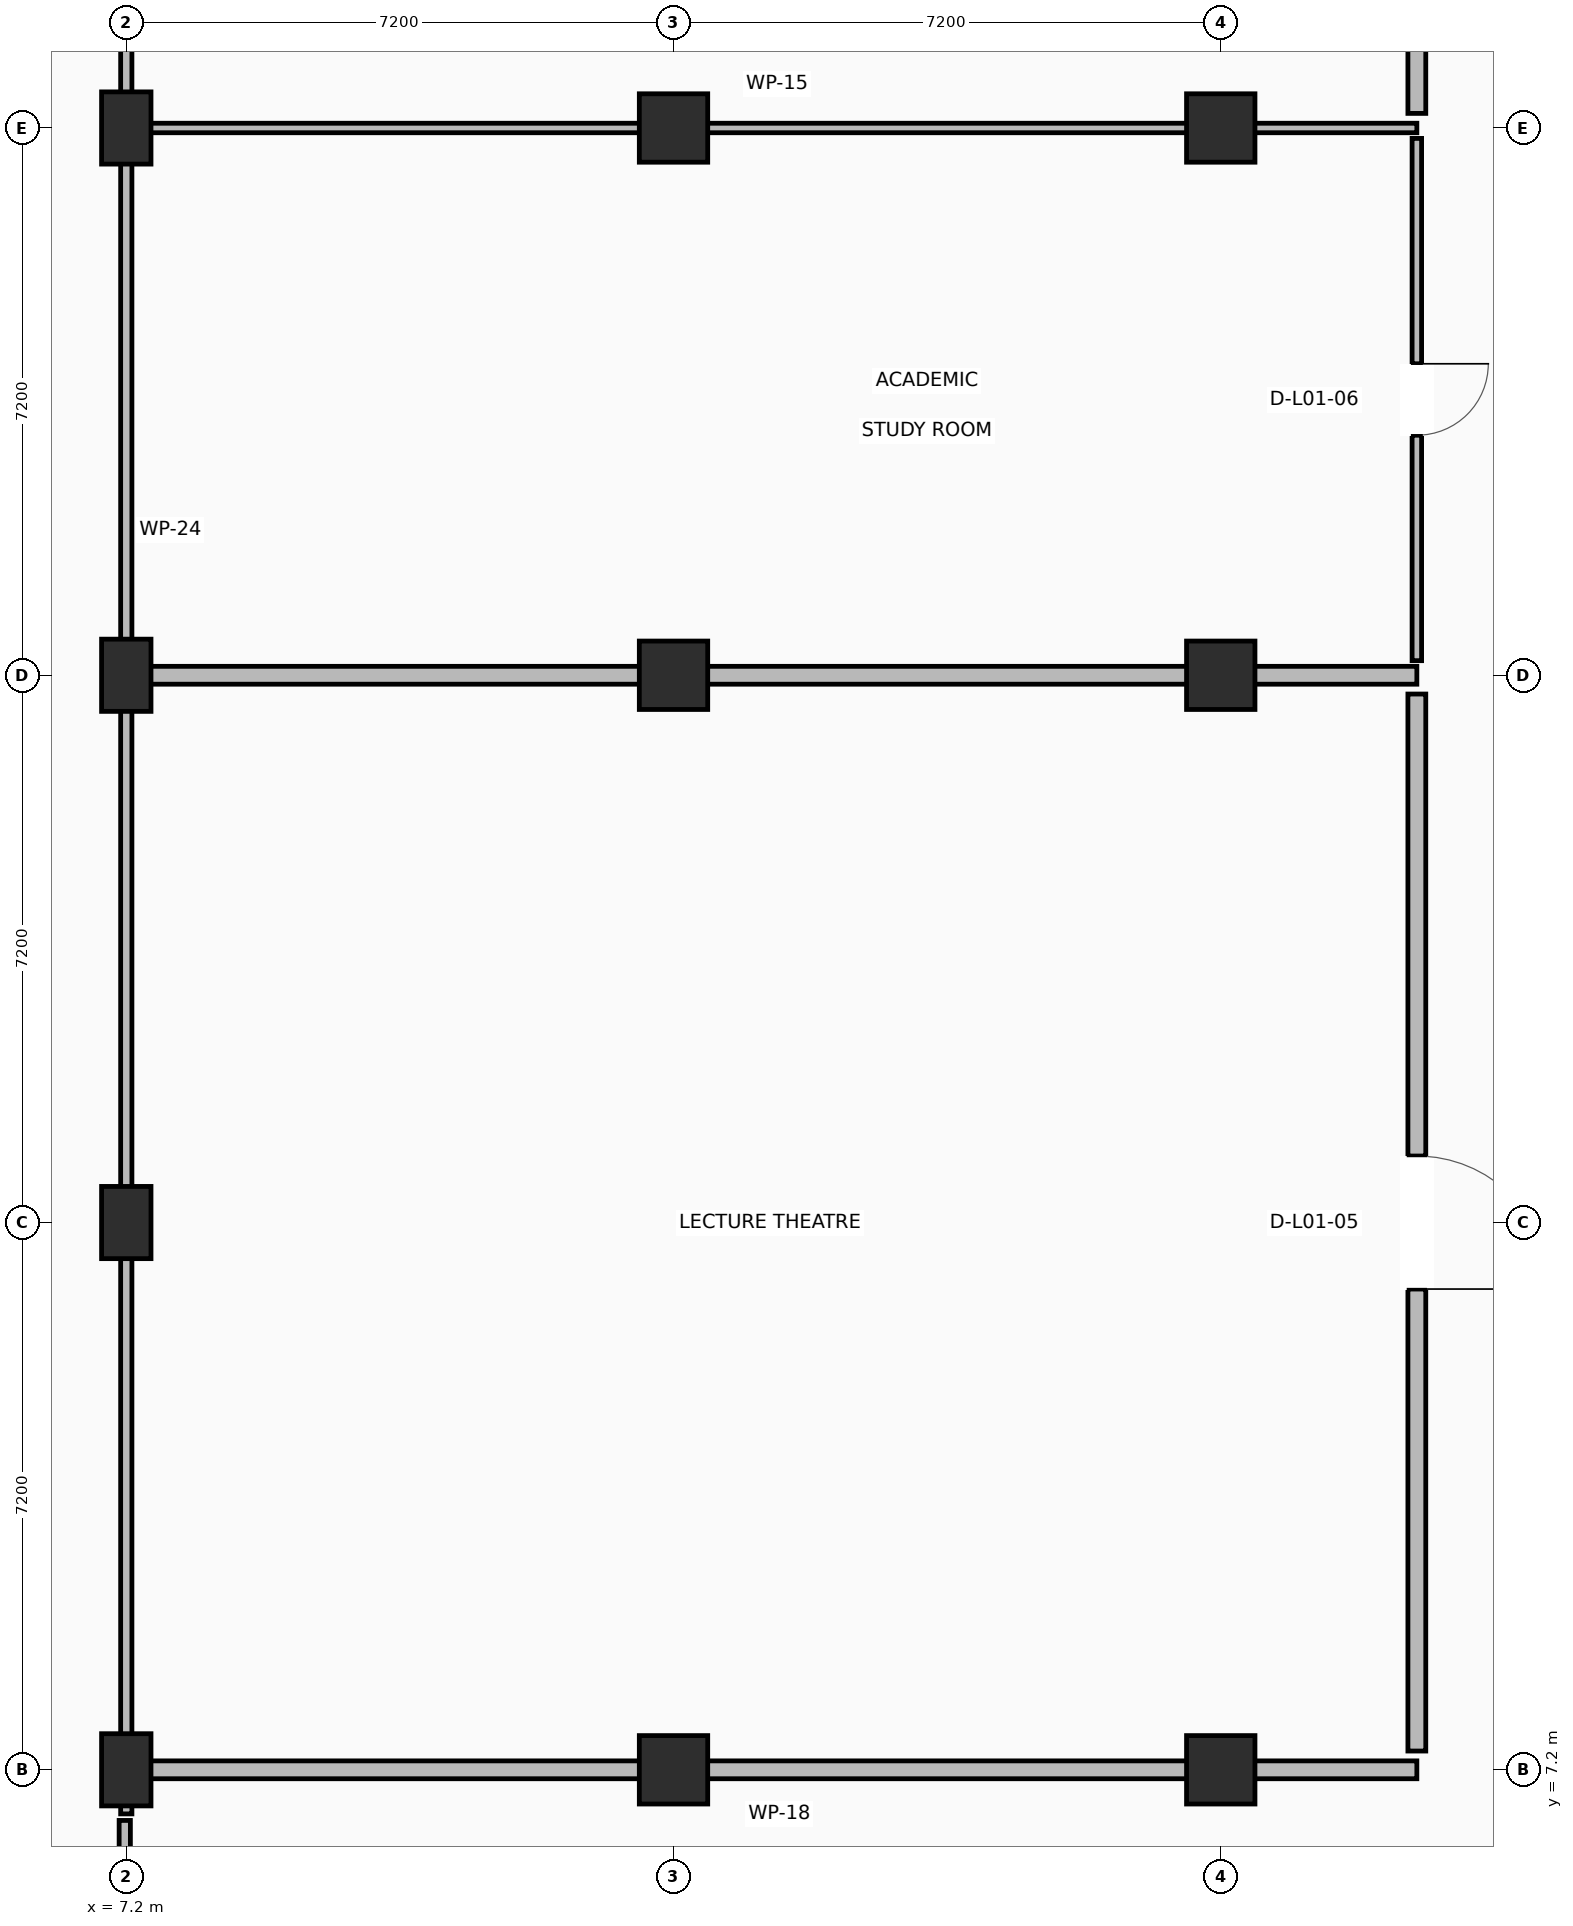
"""IFC4 building model, lengths in metres.
Left out: names, types, materials, properties, quantities, classifications, styles, units other than length and angle.
Written with IfcOpenShell. Run it as: python <this file> out.ifc"""

import sys

from ifc_helpers import new_model, si_unit, direction, frame, frame_2d, origin, origin_2d, place, context, subcontext, project, spatial, rectangle, extrude, element, fill, save


model = new_model("IFC4")
c1 = context("Model", 3, precision=1e-05, world=origin(), true_north=direction((0.0, 1.0)))
c2 = subcontext(c1, "Body", "Model", "MODEL_VIEW")
j1 = project(units=[si_unit("LENGTHUNIT", "METRE"), si_unit("PLANEANGLEUNIT", "RADIAN")], contexts=[c1])
p1 = place(None, origin())
s1 = spatial("IfcSite", under=j1, at=p1, CompositionType="ELEMENT")
p2 = place(p1, origin())
s2 = spatial("IfcBuilding", under=s1, at=p2, CompositionType="ELEMENT")
p3 = place(p2, frame((0.0, 0.0, 4.5)))
s3 = spatial("IfcBuildingStorey", under=s2, at=p3, CompositionType="ELEMENT", Elevation=4.5)
for number, where, z_axis, x_axis in (
    (1, (7.2, 7.2, 0.0), (0.0, 0.0, 1.0), (1.0, 0.0, 0.0)),
    (2, (7.2, 14.4, 0.0), (0.0, 0.0, 1.0), (1.0, 0.0, 0.0)),
    (3, (7.2, 21.6, 0.0), (0.0, 0.0, 1.0), (1.0, 0.0, 0.0)),
    (4, (7.2, 28.8, 0.0), (0.0, 0.0, 1.0), (1.0, 0.0, 0.0)),
):
    element("IfcColumn", number, at=place(p3, frame(where, z_axis=z_axis, x_axis=x_axis)), inside=s3, PredefinedType="COLUMN", context=c2, shape_type="SweptSolid", body=[
        extrude(rectangle(XDim=0.65, YDim=0.95, at=origin_2d()), origin(), (0.0, 0.0, 1.0), 4.5),
    ])
for number, where, z_axis, x_axis in (
    (5, (14.4, 7.2, 0.0), (0.0, 0.0, 1.0), (1.0, 0.0, 0.0)),
    (6, (14.4, 21.6, 0.0), (0.0, 0.0, 1.0), (1.0, 0.0, 0.0)),
    (7, (14.4, 28.8, 0.0), (0.0, 0.0, 1.0), (1.0, 0.0, 0.0)),
    (8, (21.6, 7.2, 0.0), (0.0, 0.0, 1.0), (1.0, 0.0, 0.0)),
    (9, (21.6, 21.6, 0.0), (0.0, 0.0, 1.0), (1.0, 0.0, 0.0)),
    (10, (21.6, 28.8, 0.0), (0.0, 0.0, 1.0), (1.0, 0.0, 0.0)),
):
    element("IfcColumn", number, at=place(p3, frame(where, z_axis=z_axis, x_axis=x_axis)), inside=s3, PredefinedType="COLUMN", context=c2, shape_type="SweptSolid", body=[
        extrude(rectangle(XDim=0.9, YDim=0.9, at=origin_2d()), origin(), (0.0, 0.0, 1.0), 4.5),
    ])
p4 = place(p3, frame((7.2, 42.774, 0.0), z_axis=(0.0, 0.0, 1.0), x_axis=(0.0, -1.0, 0.0)))
e11 = element("IfcWall", 11, at=p4, inside=s3, PredefinedType="PARTITIONING", context=c2, shape_type="SweptSolid", body=[
    extrude(rectangle(XDim=36.154, YDim=0.148, at=frame_2d((18.077, 0.0))), origin(), (0.0, 0.0, 1.0), 3.26),
])
p5 = place(p3, frame((7.18, 6.534, 0.0), z_axis=(0.0, 0.0, 1.0), x_axis=(0.0, -1.0, 0.0)))
e12 = element("IfcWall", 12, at=p5, inside=s3, PredefinedType="PARTITIONING", context=c2, shape_type="SweptSolid", body=[
    extrude(rectangle(XDim=2.934, YDim=0.148, at=frame_2d((1.467, 0.0))), origin(), (0.0, 0.0, 1.0), 3.26),
])
p6 = place(p5, frame((1.007, 0.0, 0.0)))
e13 = element("IfcOpeningElement", 13, at=p6, cuts=e12, PredefinedType="OPENING", context=c2, shape_type="SweptSolid", body=[
    extrude(rectangle(XDim=0.92, YDim=2.1, at=frame_2d((0.46, 1.05))), frame((0.0, 0.084, 0.0), z_axis=(0.0, -1.0, 0.0), x_axis=(1.0, 0.0, 0.0)), (0.0, 0.0, 1.0), 0.168),
])
for number, where, z_axis, x_axis in (
    (14, (24.18, 7.2, 0.0), (0.0, 0.0, 1.0), (-1.0, 0.0, 0.0)),
    (15, (7.404, 21.6, 0.0), (0.0, 0.0, 1.0), (1.0, 0.0, 0.0)),
):
    element("IfcWall", number, at=place(p3, frame(where, z_axis=z_axis, x_axis=x_axis)), inside=s3, PredefinedType="PARTITIONING", context=c2, shape_type="SweptSolid", body=[
        extrude(rectangle(XDim=16.776, YDim=0.235, at=frame_2d((8.388, 0.0))), origin(), (0.0, 0.0, 1.0), 3.26),
    ])
p7 = place(p3, frame((24.18, 21.353, 0.0), z_axis=(0.0, 0.0, 1.0), x_axis=(0.0, -1.0, 0.0)))
e16 = element("IfcWall", 16, at=p7, inside=s3, PredefinedType="PARTITIONING", context=c2, shape_type="SweptSolid", body=[
    extrude(rectangle(XDim=13.906, YDim=0.235, at=frame_2d((6.953, 0.0))), origin(), (0.0, 0.0, 1.0), 3.26),
])
p8 = place(p7, frame((6.078, 0.0, 0.0)))
e17 = element("IfcOpeningElement", 17, at=p8, cuts=e16, PredefinedType="OPENING", context=c2, shape_type="SweptSolid", body=[
    extrude(rectangle(XDim=1.75, YDim=2.25, at=frame_2d((0.875, 1.125))), frame((0.0, 0.127, 0.0), z_axis=(0.0, -1.0, 0.0), x_axis=(1.0, 0.0, 0.0)), (0.0, 0.0, 1.0), 0.255),
])
p9 = place(p3, frame((7.348, 28.8, 0.0), z_axis=(0.0, 0.0, 1.0), x_axis=(1.0, 0.0, 0.0)))
e18 = element("IfcWall", 18, at=p9, inside=s3, PredefinedType="PARTITIONING", context=c2, shape_type="SweptSolid", body=[
    extrude(rectangle(XDim=16.832, YDim=0.125, at=frame_2d((8.416, 0.0))), origin(), (0.0, 0.0, 1.0), 3.26),
])
p10 = place(p3, frame((24.18, 28.663, 0.0), z_axis=(0.0, 0.0, 1.0), x_axis=(0.0, -1.0, 0.0)))
e19 = element("IfcWall", 19, at=p10, inside=s3, PredefinedType="PARTITIONING", context=c2, shape_type="SweptSolid", body=[
    extrude(rectangle(XDim=6.871, YDim=0.125, at=frame_2d((3.436, 0.0))), origin(), (0.0, 0.0, 1.0), 3.26),
])
p11 = place(p10, frame((2.965, 0.0, 0.0)))
e20 = element("IfcOpeningElement", 20, at=p11, cuts=e19, PredefinedType="OPENING", context=c2, shape_type="SweptSolid", body=[
    extrude(rectangle(XDim=0.94, YDim=2.1, at=frame_2d((0.47, 1.05))), frame((0.0, 0.073, 0.0), z_axis=(0.0, -1.0, 0.0), x_axis=(1.0, 0.0, 0.0)), (0.0, 0.0, 1.0), 0.145),
])
p12 = place(p3, frame((24.18, 39.0, 0.0), z_axis=(0.0, 0.0, 1.0), x_axis=(0.0, -1.0, 0.0)))
e21 = element("IfcWall", 21, at=p12, inside=s3, PredefinedType="PARTITIONING", context=c2, shape_type="SweptSolid", body=[
    extrude(rectangle(XDim=10.008, YDim=0.235, at=frame_2d((5.004, 0.0))), origin(), (0.0, 0.0, 1.0), 3.26),
])
p13 = place(p12, frame((4.129, 0.0, 0.0)))
e22 = element("IfcOpeningElement", 22, at=p13, cuts=e21, PredefinedType="OPENING", context=c2, shape_type="SweptSolid", body=[
    extrude(rectangle(XDim=1.75, YDim=2.25, at=frame_2d((0.875, 1.125))), frame((0.0, 0.127, 0.0), z_axis=(0.0, -1.0, 0.0), x_axis=(1.0, 0.0, 0.0)), (0.0, 0.0, 1.0), 0.255),
])
p14 = place(p8, origin())
e23 = element("IfcDoor", 23, at=p14, inside=s3, OperationType="SINGLE_SWING_RIGHT", PredefinedType="DOOR", context=c2, shape_type="SweptSolid", body=[
    extrude(rectangle(XDim=1.75, YDim=2.25, at=frame_2d((0.875, 1.125))), frame((0.0, 0.025, 0.0), z_axis=(0.0, -1.0, 0.0), x_axis=(1.0, 0.0, 0.0)), (0.0, 0.0, 1.0), 0.05),
])
fill(e17, e23)
p15 = place(p11, origin())
e24 = element("IfcDoor", 24, at=p15, inside=s3, OperationType="SINGLE_SWING_LEFT", PredefinedType="DOOR", context=c2, shape_type="SweptSolid", body=[
    extrude(rectangle(XDim=0.94, YDim=2.1, at=frame_2d((0.47, 1.05))), frame((0.0, 0.025, 0.0), z_axis=(0.0, -1.0, 0.0), x_axis=(1.0, 0.0, 0.0)), (0.0, 0.0, 1.0), 0.05),
])
fill(e20, e24)
save(model, sys.argv[1])
